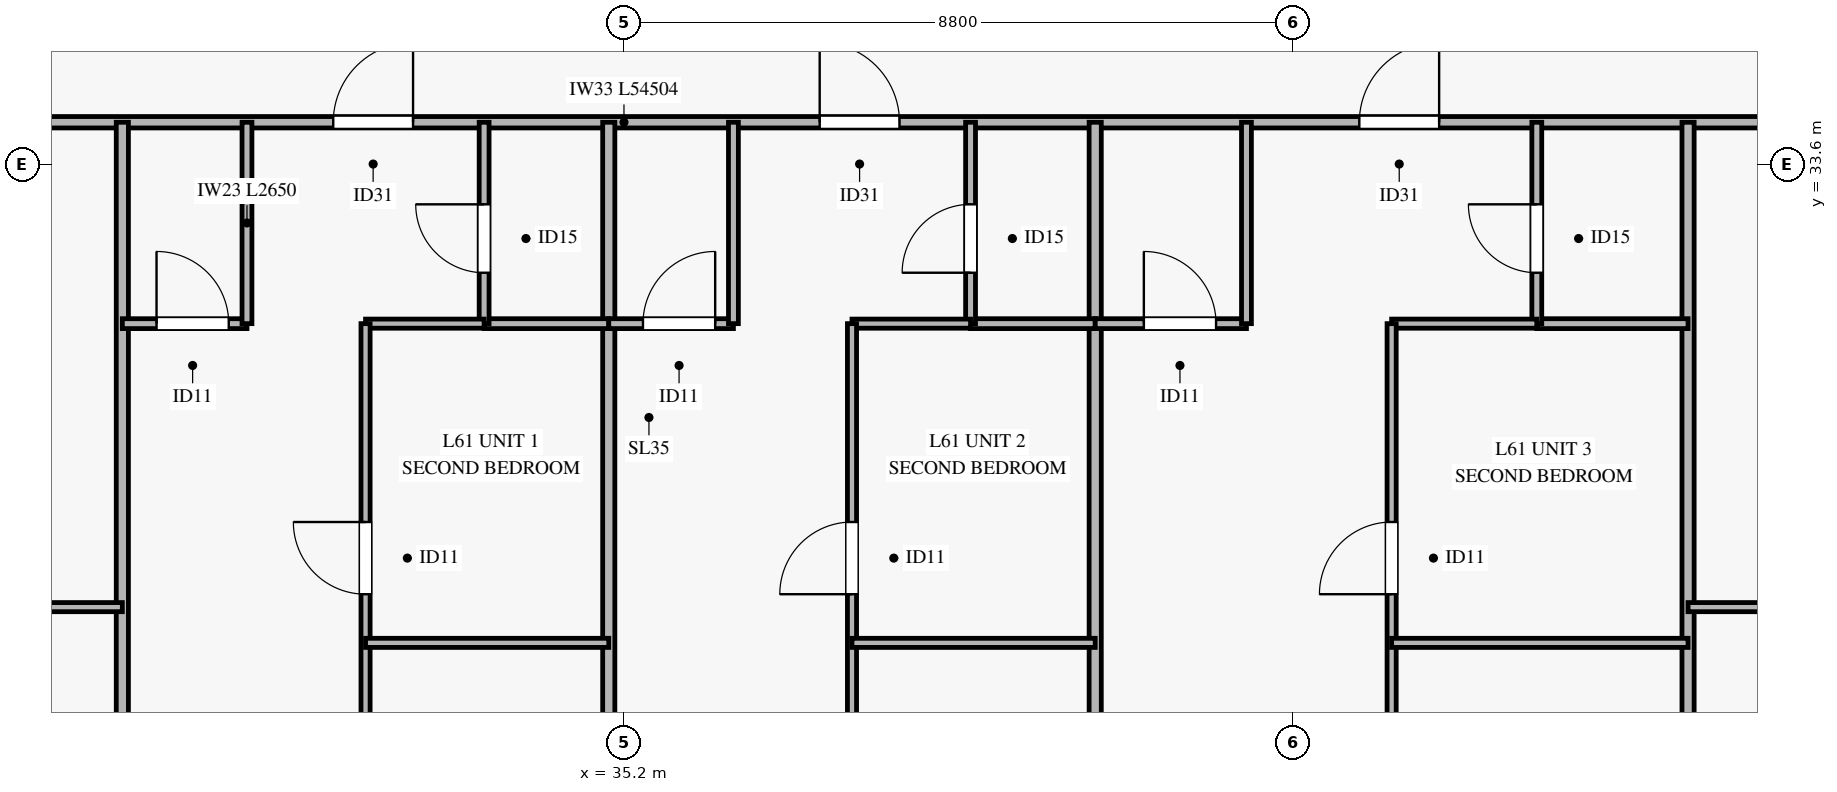
"""IFC4 building model, lengths in metres.
Left out: names, types, materials, properties, quantities, classifications, styles, units other than length and angle.
Written with IfcOpenShell. Run it as: python <this file> out.ifc"""

import sys

from ifc_helpers import new_model, si_unit, direction, frame, frame_2d, origin, place, context, subcontext, project, spatial, rectangle, extrude, source, transform, mapped, element, fill, save


model = new_model("IFC4")
c1 = context("Model", 3, precision=1e-05, world=origin(), true_north=direction((0.0, 1.0)))
c2 = subcontext(c1, "Body", "Model", "MODEL_VIEW")
j1 = project(units=[si_unit("LENGTHUNIT", "METRE"), si_unit("PLANEANGLEUNIT", "RADIAN")], contexts=[c1])
p1 = place(None, origin())
s1 = spatial("IfcSite", under=j1, at=p1, CompositionType="ELEMENT")
p2 = place(p1, origin())
s2 = spatial("IfcBuilding", under=s1, at=p2, CompositionType="ELEMENT")
p3 = place(p2, frame((0.0, 0.0, 241.7)))
s3 = spatial("IfcBuildingStorey", under=s2, at=p3, CompositionType="ELEMENT", Elevation=241.7)
p4 = place(p3, frame((7.948, 34.15, 0.0), z_axis=(0.0, 0.0, 1.0), x_axis=(1.0, 0.0, 0.0)))
e1 = element("IfcWall", 1, at=p4, inside=s3, PredefinedType="PARTITIONING", context=c2, shape_type="SweptSolid", body=[
    extrude(rectangle(XDim=54.504, YDim=0.15, at=frame_2d((27.252, 0.0))), origin(), (0.0, 0.0, 1.0), 2.47),
])
p5 = place(p4, frame((5.785, 0.0, 0.0)))
e2 = element("IfcOpeningElement", 2, at=p5, cuts=e1, PredefinedType="OPENING", context=c2, shape_type="SweptSolid", body=[
    extrude(rectangle(XDim=1.05, YDim=2.15, at=frame_2d((0.525, 1.075))), frame((0.0, 0.085, 0.0), z_axis=(0.0, -1.0, 0.0), x_axis=(1.0, 0.0, 0.0)), (0.0, 0.0, 1.0), 0.17),
])
p6 = place(p4, frame((16.977, 0.0, 0.0)))
e3 = element("IfcOpeningElement", 3, at=p6, cuts=e1, PredefinedType="OPENING", context=c2, shape_type="SweptSolid", body=[
    extrude(rectangle(XDim=1.05, YDim=2.15, at=frame_2d((0.525, 1.075))), frame((0.0, 0.085, 0.0), z_axis=(0.0, -1.0, 0.0), x_axis=(1.0, 0.0, 0.0)), (0.0, 0.0, 1.0), 0.17),
])
p7 = place(p4, frame((23.427, 0.0, 0.0)))
e4 = element("IfcOpeningElement", 4, at=p7, cuts=e1, PredefinedType="OPENING", context=c2, shape_type="SweptSolid", body=[
    extrude(rectangle(XDim=1.05, YDim=2.15, at=frame_2d((0.525, 1.075))), frame((0.0, 0.085, 0.0), z_axis=(0.0, -1.0, 0.0), x_axis=(1.0, 0.0, 0.0)), (0.0, 0.0, 1.0), 0.17),
])
p8 = place(p4, frame((29.827, 0.0, 0.0)))
e5 = element("IfcOpeningElement", 5, at=p8, cuts=e1, PredefinedType="OPENING", context=c2, shape_type="SweptSolid", body=[
    extrude(rectangle(XDim=1.05, YDim=2.15, at=frame_2d((0.525, 1.075))), frame((0.0, 0.085, 0.0), z_axis=(0.0, -1.0, 0.0), x_axis=(1.0, 0.0, 0.0)), (0.0, 0.0, 1.0), 0.17),
])
p9 = place(p4, frame((36.927, 0.0, 0.0)))
e6 = element("IfcOpeningElement", 6, at=p9, cuts=e1, PredefinedType="OPENING", context=c2, shape_type="SweptSolid", body=[
    extrude(rectangle(XDim=1.05, YDim=2.15, at=frame_2d((0.525, 1.075))), frame((0.0, 0.085, 0.0), z_axis=(0.0, -1.0, 0.0), x_axis=(1.0, 0.0, 0.0)), (0.0, 0.0, 1.0), 0.17),
])
p10 = place(p4, frame((46.381, 0.0, 0.0)))
e7 = element("IfcOpeningElement", 7, at=p10, cuts=e1, PredefinedType="OPENING", context=c2, shape_type="SweptSolid", body=[
    extrude(rectangle(XDim=1.05, YDim=2.15, at=frame_2d((0.525, 1.075))), frame((0.0, 0.085, 0.0), z_axis=(0.0, -1.0, 0.0), x_axis=(1.0, 0.0, 0.0)), (0.0, 0.0, 1.0), 0.17),
])
for number, where, z_axis, x_axis in (
    (8, (28.6, 14.182, 0.0), (0.0, 0.0, 1.0), (0.0, 1.0, 0.0)),
    (9, (35.0, 14.182, 0.0), (0.0, 0.0, 1.0), (0.0, 1.0, 0.0)),
    (10, (41.4, 14.182, 0.0), (0.0, 0.0, 1.0), (0.0, 1.0, 0.0)),
    (11, (49.2, 14.182, 0.0), (0.0, 0.0, 1.0), (0.0, 1.0, 0.0)),
):
    element("IfcWall", number, at=place(p3, frame(where, z_axis=z_axis, x_axis=x_axis)), inside=s3, PredefinedType="PARTITIONING", context=c2, shape_type="SweptSolid", body=[
        extrude(rectangle(XDim=19.968, YDim=0.16, at=frame_2d((9.984, 0.0))), origin(), (0.0, 0.0, 1.0), 2.77),
    ])
p11 = place(p3, frame((22.4, 27.77, 0.0), z_axis=(0.0, 0.0, 1.0), x_axis=(1.0, 0.0, 0.0)))
e12 = element("IfcWall", 12, at=p11, inside=s3, PredefinedType="PARTITIONING", context=c2, shape_type="SweptSolid", body=[
    extrude(rectangle(XDim=6.2, YDim=0.12, at=frame_2d((3.1, 0.0))), origin(), (0.0, 0.0, 1.0), 3.185),
])
p12 = place(p11, frame((2.646, 0.0, 0.0)))
e13 = element("IfcOpeningElement", 13, at=p12, cuts=e12, PredefinedType="OPENING", context=c2, shape_type="SweptSolid", body=[
    extrude(rectangle(XDim=0.95, YDim=2.1, at=frame_2d((0.475, 1.05))), frame((0.0, 0.07, 0.0), z_axis=(0.0, -1.0, 0.0), x_axis=(1.0, 0.0, 0.0)), (0.0, 0.0, 1.0), 0.14),
])
p13 = place(p3, frame((28.6, 31.5, 0.0), z_axis=(0.0, 0.0, 1.0), x_axis=(1.0, 0.0, 0.0)))
e14 = element("IfcWall", 14, at=p13, inside=s3, PredefinedType="PARTITIONING", context=c2, shape_type="SweptSolid", body=[
    extrude(rectangle(XDim=1.64, YDim=0.13, at=frame_2d((0.82, 0.0))), origin(), (0.0, 0.0, 1.0), 3.185),
])
p14 = place(p13, frame((0.45, 0.0, 0.0)))
e15 = element("IfcOpeningElement", 15, at=p14, cuts=e14, PredefinedType="OPENING", context=c2, shape_type="SweptSolid", body=[
    extrude(rectangle(XDim=0.95, YDim=2.1, at=frame_2d((0.475, 1.05))), frame((0.0, 0.075, 0.0), z_axis=(0.0, -1.0, 0.0), x_axis=(1.0, 0.0, 0.0)), (0.0, 0.0, 1.0), 0.15),
])
p15 = place(p3, frame((30.24, 31.5, 0.0), z_axis=(0.0, 0.0, 1.0), x_axis=(0.0, 1.0, 0.0)))
e16 = element("IfcWall", 16, at=p15, inside=s3, PredefinedType="PARTITIONING", context=c2, shape_type="SweptSolid", body=[
    extrude(rectangle(XDim=2.65, YDim=0.13, at=frame_2d((1.325, 0.0))), origin(), (0.0, 0.0, 1.0), 2.77),
])
p16 = place(p3, frame((33.36, 31.5, 0.0), z_axis=(0.0, 0.0, 1.0), x_axis=(1.0, 0.0, 0.0)))
e17 = element("IfcWall", 17, at=p16, inside=s3, PredefinedType="PARTITIONING", context=c2, shape_type="SweptSolid", body=[
    extrude(rectangle(XDim=1.64, YDim=0.13, at=frame_2d((0.82, 0.0))), origin(), (0.0, 0.0, 1.0), 3.185),
])
p17 = place(p3, frame((33.36, 31.5, 0.0), z_axis=(0.0, 0.0, 1.0), x_axis=(0.0, 1.0, 0.0)))
e18 = element("IfcWall", 18, at=p17, inside=s3, PredefinedType="PARTITIONING", context=c2, shape_type="SweptSolid", body=[
    extrude(rectangle(XDim=2.65, YDim=0.13, at=frame_2d((1.325, 0.0))), origin(), (0.0, 0.0, 1.0), 2.77),
])
p18 = place(p17, frame((0.67, 0.0, 0.0)))
e19 = element("IfcOpeningElement", 19, at=p18, cuts=e18, PredefinedType="OPENING", context=c2, shape_type="SweptSolid", body=[
    extrude(rectangle(XDim=0.9, YDim=2.1, at=frame_2d((0.45, 1.05))), frame((0.0, 0.075, 0.0), z_axis=(0.0, -1.0, 0.0), x_axis=(1.0, 0.0, 0.0)), (0.0, 0.0, 1.0), 0.15),
])
p19 = place(p3, frame((31.8, 31.5, 0.0), z_axis=(0.0, 0.0, 1.0), x_axis=(1.0, 0.0, 0.0)))
e20 = element("IfcWall", 20, at=p19, inside=s3, PredefinedType="PARTITIONING", context=c2, shape_type="SweptSolid", body=[
    extrude(rectangle(XDim=1.56, YDim=0.12, at=frame_2d((0.78, 0.0))), origin(), (0.0, 0.0, 1.0), 3.185),
])
p20 = place(p3, frame((31.8, 14.182, 0.0), z_axis=(0.0, 0.0, 1.0), x_axis=(0.0, 1.0, 0.0)))
e21 = element("IfcWall", 21, at=p20, inside=s3, PredefinedType="PARTITIONING", context=c2, shape_type="SweptSolid", body=[
    extrude(rectangle(XDim=17.318, YDim=0.12, at=frame_2d((8.659, 0.0))), origin(), (0.0, 0.0, 1.0), 2.77),
])
p21 = place(p20, frame((1.59, 0.0, 0.0)))
e22 = element("IfcOpeningElement", 22, at=p21, cuts=e21, PredefinedType="OPENING", context=c2, shape_type="SweptSolid", body=[
    extrude(rectangle(XDim=0.95, YDim=2.1, at=frame_2d((0.475, 1.05))), frame((0.0, 0.07, 0.0), z_axis=(0.0, -1.0, 0.0), x_axis=(1.0, 0.0, 0.0)), (0.0, 0.0, 1.0), 0.14),
])
p22 = place(p20, frame((13.758, 0.0, 0.0)))
e23 = element("IfcOpeningElement", 23, at=p22, cuts=e21, PredefinedType="OPENING", context=c2, shape_type="SweptSolid", body=[
    extrude(rectangle(XDim=0.95, YDim=2.1, at=frame_2d((0.475, 1.05))), frame((0.0, 0.07, 0.0), z_axis=(0.0, -1.0, 0.0), x_axis=(1.0, 0.0, 0.0)), (0.0, 0.0, 1.0), 0.14),
])
p23 = place(p3, frame((31.8, 27.3, 0.0), z_axis=(0.0, 0.0, 1.0), x_axis=(1.0, 0.0, 0.0)))
e24 = element("IfcWall", 24, at=p23, inside=s3, PredefinedType="PARTITIONING", context=c2, shape_type="SweptSolid", body=[
    extrude(rectangle(XDim=3.2, YDim=0.12, at=frame_2d((1.6, 0.0))), origin(), (0.0, 0.0, 1.0), 3.185),
])
p24 = place(p3, frame((35.0, 31.5, 0.0), z_axis=(0.0, 0.0, 1.0), x_axis=(1.0, 0.0, 0.0)))
e25 = element("IfcWall", 25, at=p24, inside=s3, PredefinedType="PARTITIONING", context=c2, shape_type="SweptSolid", body=[
    extrude(rectangle(XDim=1.64, YDim=0.13, at=frame_2d((0.82, 0.0))), origin(), (0.0, 0.0, 1.0), 3.185),
])
p25 = place(p24, frame((0.45, 0.0, 0.0)))
e26 = element("IfcOpeningElement", 26, at=p25, cuts=e25, PredefinedType="OPENING", context=c2, shape_type="SweptSolid", body=[
    extrude(rectangle(XDim=0.95, YDim=2.1, at=frame_2d((0.475, 1.05))), frame((0.0, 0.075, 0.0), z_axis=(0.0, -1.0, 0.0), x_axis=(1.0, 0.0, 0.0)), (0.0, 0.0, 1.0), 0.15),
])
p26 = place(p3, frame((36.64, 31.5, 0.0), z_axis=(0.0, 0.0, 1.0), x_axis=(0.0, 1.0, 0.0)))
e27 = element("IfcWall", 27, at=p26, inside=s3, PredefinedType="PARTITIONING", context=c2, shape_type="SweptSolid", body=[
    extrude(rectangle(XDim=2.65, YDim=0.13, at=frame_2d((1.325, 0.0))), origin(), (0.0, 0.0, 1.0), 2.77),
])
p27 = place(p3, frame((39.76, 31.5, 0.0), z_axis=(0.0, 0.0, 1.0), x_axis=(1.0, 0.0, 0.0)))
e28 = element("IfcWall", 28, at=p27, inside=s3, PredefinedType="PARTITIONING", context=c2, shape_type="SweptSolid", body=[
    extrude(rectangle(XDim=1.64, YDim=0.13, at=frame_2d((0.82, 0.0))), origin(), (0.0, 0.0, 1.0), 3.185),
])
p28 = place(p3, frame((39.76, 31.5, 0.0), z_axis=(0.0, 0.0, 1.0), x_axis=(0.0, 1.0, 0.0)))
e29 = element("IfcWall", 29, at=p28, inside=s3, PredefinedType="PARTITIONING", context=c2, shape_type="SweptSolid", body=[
    extrude(rectangle(XDim=2.65, YDim=0.13, at=frame_2d((1.325, 0.0))), origin(), (0.0, 0.0, 1.0), 2.77),
])
p29 = place(p28, frame((0.67, 0.0, 0.0)))
e30 = element("IfcOpeningElement", 30, at=p29, cuts=e29, PredefinedType="OPENING", context=c2, shape_type="SweptSolid", body=[
    extrude(rectangle(XDim=0.9, YDim=2.1, at=frame_2d((0.45, 1.05))), frame((0.0, 0.075, 0.0), z_axis=(0.0, -1.0, 0.0), x_axis=(1.0, 0.0, 0.0)), (0.0, 0.0, 1.0), 0.15),
])
p30 = place(p3, frame((38.2, 31.5, 0.0), z_axis=(0.0, 0.0, 1.0), x_axis=(1.0, 0.0, 0.0)))
e31 = element("IfcWall", 31, at=p30, inside=s3, PredefinedType="PARTITIONING", context=c2, shape_type="SweptSolid", body=[
    extrude(rectangle(XDim=1.56, YDim=0.12, at=frame_2d((0.78, 0.0))), origin(), (0.0, 0.0, 1.0), 3.185),
])
p31 = place(p3, frame((38.2, 14.182, 0.0), z_axis=(0.0, 0.0, 1.0), x_axis=(0.0, 1.0, 0.0)))
e32 = element("IfcWall", 32, at=p31, inside=s3, PredefinedType="PARTITIONING", context=c2, shape_type="SweptSolid", body=[
    extrude(rectangle(XDim=17.318, YDim=0.12, at=frame_2d((8.659, 0.0))), origin(), (0.0, 0.0, 1.0), 2.77),
])
p32 = place(p31, frame((1.59, 0.0, 0.0)))
e33 = element("IfcOpeningElement", 33, at=p32, cuts=e32, PredefinedType="OPENING", context=c2, shape_type="SweptSolid", body=[
    extrude(rectangle(XDim=0.95, YDim=2.1, at=frame_2d((0.475, 1.05))), frame((0.0, 0.07, 0.0), z_axis=(0.0, -1.0, 0.0), x_axis=(1.0, 0.0, 0.0)), (0.0, 0.0, 1.0), 0.14),
])
p33 = place(p31, frame((13.758, 0.0, 0.0)))
e34 = element("IfcOpeningElement", 34, at=p33, cuts=e32, PredefinedType="OPENING", context=c2, shape_type="SweptSolid", body=[
    extrude(rectangle(XDim=0.95, YDim=2.1, at=frame_2d((0.475, 1.05))), frame((0.0, 0.07, 0.0), z_axis=(0.0, -1.0, 0.0), x_axis=(1.0, 0.0, 0.0)), (0.0, 0.0, 1.0), 0.14),
])
p34 = place(p3, frame((38.2, 27.3, 0.0), z_axis=(0.0, 0.0, 1.0), x_axis=(1.0, 0.0, 0.0)))
e35 = element("IfcWall", 35, at=p34, inside=s3, PredefinedType="PARTITIONING", context=c2, shape_type="SweptSolid", body=[
    extrude(rectangle(XDim=3.2, YDim=0.12, at=frame_2d((1.6, 0.0))), origin(), (0.0, 0.0, 1.0), 3.185),
])
p35 = place(p3, frame((41.4, 31.5, 0.0), z_axis=(0.0, 0.0, 1.0), x_axis=(1.0, 0.0, 0.0)))
e36 = element("IfcWall", 36, at=p35, inside=s3, PredefinedType="PARTITIONING", context=c2, shape_type="SweptSolid", body=[
    extrude(rectangle(XDim=1.99, YDim=0.13, at=frame_2d((0.995, 0.0))), origin(), (0.0, 0.0, 1.0), 3.185),
])
p36 = place(p35, frame((0.64, 0.0, 0.0)))
e37 = element("IfcOpeningElement", 37, at=p36, cuts=e36, PredefinedType="OPENING", context=c2, shape_type="SweptSolid", body=[
    extrude(rectangle(XDim=0.95, YDim=2.1, at=frame_2d((0.475, 1.05))), frame((0.0, 0.075, 0.0), z_axis=(0.0, -1.0, 0.0), x_axis=(1.0, 0.0, 0.0)), (0.0, 0.0, 1.0), 0.15),
])
p37 = place(p3, frame((43.39, 31.5, 0.0), z_axis=(0.0, 0.0, 1.0), x_axis=(0.0, 1.0, 0.0)))
e38 = element("IfcWall", 38, at=p37, inside=s3, PredefinedType="PARTITIONING", context=c2, shape_type="SweptSolid", body=[
    extrude(rectangle(XDim=2.65, YDim=0.13, at=frame_2d((1.325, 0.0))), origin(), (0.0, 0.0, 1.0), 2.77),
])
p38 = place(p3, frame((47.21, 31.5, 0.0), z_axis=(0.0, 0.0, 1.0), x_axis=(1.0, 0.0, 0.0)))
e39 = element("IfcWall", 39, at=p38, inside=s3, PredefinedType="PARTITIONING", context=c2, shape_type="SweptSolid", body=[
    extrude(rectangle(XDim=1.99, YDim=0.13, at=frame_2d((0.995, 0.0))), origin(), (0.0, 0.0, 1.0), 3.185),
])
p39 = place(p3, frame((47.21, 31.5, 0.0), z_axis=(0.0, 0.0, 1.0), x_axis=(0.0, 1.0, 0.0)))
e40 = element("IfcWall", 40, at=p39, inside=s3, PredefinedType="PARTITIONING", context=c2, shape_type="SweptSolid", body=[
    extrude(rectangle(XDim=2.65, YDim=0.13, at=frame_2d((1.325, 0.0))), origin(), (0.0, 0.0, 1.0), 2.77),
])
p40 = place(p39, frame((0.67, 0.0, 0.0)))
e41 = element("IfcOpeningElement", 41, at=p40, cuts=e40, PredefinedType="OPENING", context=c2, shape_type="SweptSolid", body=[
    extrude(rectangle(XDim=0.9, YDim=2.1, at=frame_2d((0.45, 1.05))), frame((0.0, 0.075, 0.0), z_axis=(0.0, -1.0, 0.0), x_axis=(1.0, 0.0, 0.0)), (0.0, 0.0, 1.0), 0.15),
])
p41 = place(p3, frame((45.3, 31.5, 0.0), z_axis=(0.0, 0.0, 1.0), x_axis=(1.0, 0.0, 0.0)))
e42 = element("IfcWall", 42, at=p41, inside=s3, PredefinedType="PARTITIONING", context=c2, shape_type="SweptSolid", body=[
    extrude(rectangle(XDim=1.91, YDim=0.12, at=frame_2d((0.955, 0.0))), origin(), (0.0, 0.0, 1.0), 3.185),
])
p42 = place(p3, frame((45.3, 14.182, 0.0), z_axis=(0.0, 0.0, 1.0), x_axis=(0.0, 1.0, 0.0)))
e43 = element("IfcWall", 43, at=p42, inside=s3, PredefinedType="PARTITIONING", context=c2, shape_type="SweptSolid", body=[
    extrude(rectangle(XDim=17.318, YDim=0.12, at=frame_2d((8.659, 0.0))), origin(), (0.0, 0.0, 1.0), 2.77),
])
p43 = place(p42, frame((3.87, 0.0, 0.0)))
e44 = element("IfcOpeningElement", 44, at=p43, cuts=e43, PredefinedType="OPENING", context=c2, shape_type="SweptSolid", body=[
    extrude(rectangle(XDim=0.95, YDim=2.1, at=frame_2d((0.475, 1.05))), frame((0.0, 0.07, 0.0), z_axis=(0.0, -1.0, 0.0), x_axis=(1.0, 0.0, 0.0)), (0.0, 0.0, 1.0), 0.14),
])
p44 = place(p42, frame((13.758, 0.0, 0.0)))
e45 = element("IfcOpeningElement", 45, at=p44, cuts=e43, PredefinedType="OPENING", context=c2, shape_type="SweptSolid", body=[
    extrude(rectangle(XDim=0.95, YDim=2.1, at=frame_2d((0.475, 1.05))), frame((0.0, 0.07, 0.0), z_axis=(0.0, -1.0, 0.0), x_axis=(1.0, 0.0, 0.0)), (0.0, 0.0, 1.0), 0.14),
])
p45 = place(p3, frame((45.3, 27.3, 0.0), z_axis=(0.0, 0.0, 1.0), x_axis=(1.0, 0.0, 0.0)))
e46 = element("IfcWall", 46, at=p45, inside=s3, PredefinedType="PARTITIONING", context=c2, shape_type="SweptSolid", body=[
    extrude(rectangle(XDim=3.9, YDim=0.12, at=frame_2d((1.95, 0.0))), origin(), (0.0, 0.0, 1.0), 3.185),
])
p46 = place(p3, frame((49.2, 27.77, 0.0), z_axis=(0.0, 0.0, 1.0), x_axis=(1.0, 0.0, 0.0)))
e47 = element("IfcWall", 47, at=p46, inside=s3, PredefinedType="PARTITIONING", context=c2, shape_type="SweptSolid", body=[
    extrude(rectangle(XDim=13.252, YDim=0.12, at=frame_2d((6.626, 0.0))), origin(), (0.0, 0.0, 1.0), 2.47),
])
p47 = place(p46, frame((5.387, 0.0, 0.0)))
e48 = element("IfcOpeningElement", 48, at=p47, cuts=e47, PredefinedType="OPENING", context=c2, shape_type="SweptSolid", body=[
    extrude(rectangle(XDim=0.95, YDim=2.1, at=frame_2d((0.475, 1.05))), frame((0.0, 0.07, 0.0), z_axis=(0.0, -1.0, 0.0), x_axis=(1.0, 0.0, 0.0)), (0.0, 0.0, 1.0), 0.14),
])
m1 = source(origin(), c2, "Body", "SweptSolid", [
    extrude(rectangle(XDim=1.05, YDim=2.15, at=frame_2d((0.525, 1.075))), frame((0.0, 0.025, 0.0), z_axis=(0.0, -1.0, 0.0), x_axis=(1.0, 0.0, 0.0)), (0.0, 0.0, 1.0), 0.05),
])
p48 = place(p7, origin())
e49 = element("IfcDoor", 49, at=p48, inside=s3, OperationType="SINGLE_SWING_RIGHT", PredefinedType="DOOR", context=c2, shape_type="MappedRepresentation", body=[
    mapped(m1, transform((0.0, 0.0, 0.0), x_axis=(1.0, 0.0, 0.0), y_axis=(0.0, 1.0, 0.0), z_axis=(0.0, 0.0, 1.0), scale=1.0)),
])
fill(e4, e49)
m2 = source(origin(), c2, "Body", "SweptSolid", [
    extrude(rectangle(XDim=0.95, YDim=2.1, at=frame_2d((0.475, 1.05))), frame((0.0, 0.025, 0.0), z_axis=(0.0, -1.0, 0.0), x_axis=(1.0, 0.0, 0.0)), (0.0, 0.0, 1.0), 0.05),
])
p49 = place(p14, origin())
e50 = element("IfcDoor", 50, at=p49, inside=s3, OperationType="SINGLE_SWING_LEFT", PredefinedType="DOOR", context=c2, shape_type="MappedRepresentation", body=[
    mapped(m2, transform((0.0, 0.0, 0.0), x_axis=(1.0, 0.0, 0.0), y_axis=(0.0, 1.0, 0.0), z_axis=(0.0, 0.0, 1.0), scale=1.0)),
])
fill(e15, e50)
m3 = source(origin(), c2, "Body", "SweptSolid", [
    extrude(rectangle(XDim=0.9, YDim=2.1, at=frame_2d((0.45, 1.05))), frame((0.0, 0.025, 0.0), z_axis=(0.0, -1.0, 0.0), x_axis=(1.0, 0.0, 0.0)), (0.0, 0.0, 1.0), 0.05),
])
p50 = place(p18, origin())
e51 = element("IfcDoor", 51, at=p50, inside=s3, OperationType="SINGLE_SWING_RIGHT", PredefinedType="DOOR", context=c2, shape_type="MappedRepresentation", body=[
    mapped(m3, transform((0.0, 0.0, 0.0), x_axis=(1.0, 0.0, 0.0), y_axis=(0.0, 1.0, 0.0), z_axis=(0.0, 0.0, 1.0), scale=1.0)),
])
fill(e19, e51)
p51 = place(p22, origin())
e52 = element("IfcDoor", 52, at=p51, inside=s3, OperationType="SINGLE_SWING_RIGHT", PredefinedType="DOOR", context=c2, shape_type="MappedRepresentation", body=[
    mapped(m2, transform((0.0, 0.0, 0.0), x_axis=(1.0, 0.0, 0.0), y_axis=(0.0, 1.0, 0.0), z_axis=(0.0, 0.0, 1.0), scale=1.0)),
])
fill(e23, e52)
p52 = place(p8, origin())
e53 = element("IfcDoor", 53, at=p52, inside=s3, OperationType="SINGLE_SWING_LEFT", PredefinedType="DOOR", context=c2, shape_type="MappedRepresentation", body=[
    mapped(m1, transform((0.0, 0.0, 0.0), x_axis=(1.0, 0.0, 0.0), y_axis=(0.0, 1.0, 0.0), z_axis=(0.0, 0.0, 1.0), scale=1.0)),
])
fill(e5, e53)
p53 = place(p25, origin())
e54 = element("IfcDoor", 54, at=p53, inside=s3, OperationType="SINGLE_SWING_RIGHT", PredefinedType="DOOR", context=c2, shape_type="MappedRepresentation", body=[
    mapped(m2, transform((0.0, 0.0, 0.0), x_axis=(1.0, 0.0, 0.0), y_axis=(0.0, 1.0, 0.0), z_axis=(0.0, 0.0, 1.0), scale=1.0)),
])
fill(e26, e54)
p54 = place(p29, origin())
e55 = element("IfcDoor", 55, at=p54, inside=s3, OperationType="SINGLE_SWING_LEFT", PredefinedType="DOOR", context=c2, shape_type="MappedRepresentation", body=[
    mapped(m3, transform((0.0, 0.0, 0.0), x_axis=(1.0, 0.0, 0.0), y_axis=(0.0, 1.0, 0.0), z_axis=(0.0, 0.0, 1.0), scale=1.0)),
])
fill(e30, e55)
p55 = place(p33, origin())
e56 = element("IfcDoor", 56, at=p55, inside=s3, OperationType="SINGLE_SWING_LEFT", PredefinedType="DOOR", context=c2, shape_type="MappedRepresentation", body=[
    mapped(m2, transform((0.0, 0.0, 0.0), x_axis=(1.0, 0.0, 0.0), y_axis=(0.0, 1.0, 0.0), z_axis=(0.0, 0.0, 1.0), scale=1.0)),
])
fill(e34, e56)
p56 = place(p9, origin())
e57 = element("IfcDoor", 57, at=p56, inside=s3, OperationType="SINGLE_SWING_RIGHT", PredefinedType="DOOR", context=c2, shape_type="MappedRepresentation", body=[
    mapped(m1, transform((0.0, 0.0, 0.0), x_axis=(1.0, 0.0, 0.0), y_axis=(0.0, 1.0, 0.0), z_axis=(0.0, 0.0, 1.0), scale=1.0)),
])
fill(e6, e57)
p57 = place(p36, origin())
e58 = element("IfcDoor", 58, at=p57, inside=s3, OperationType="SINGLE_SWING_LEFT", PredefinedType="DOOR", context=c2, shape_type="MappedRepresentation", body=[
    mapped(m2, transform((0.0, 0.0, 0.0), x_axis=(1.0, 0.0, 0.0), y_axis=(0.0, 1.0, 0.0), z_axis=(0.0, 0.0, 1.0), scale=1.0)),
])
fill(e37, e58)
p58 = place(p40, origin())
e59 = element("IfcDoor", 59, at=p58, inside=s3, OperationType="SINGLE_SWING_RIGHT", PredefinedType="DOOR", context=c2, shape_type="MappedRepresentation", body=[
    mapped(m3, transform((0.0, 0.0, 0.0), x_axis=(1.0, 0.0, 0.0), y_axis=(0.0, 1.0, 0.0), z_axis=(0.0, 0.0, 1.0), scale=1.0)),
])
fill(e41, e59)
p59 = place(p44, origin())
e60 = element("IfcDoor", 60, at=p59, inside=s3, OperationType="SINGLE_SWING_LEFT", PredefinedType="DOOR", context=c2, shape_type="MappedRepresentation", body=[
    mapped(m2, transform((0.0, 0.0, 0.0), x_axis=(1.0, 0.0, 0.0), y_axis=(0.0, 1.0, 0.0), z_axis=(0.0, 0.0, 1.0), scale=1.0)),
])
fill(e45, e60)
save(model, sys.argv[1])
